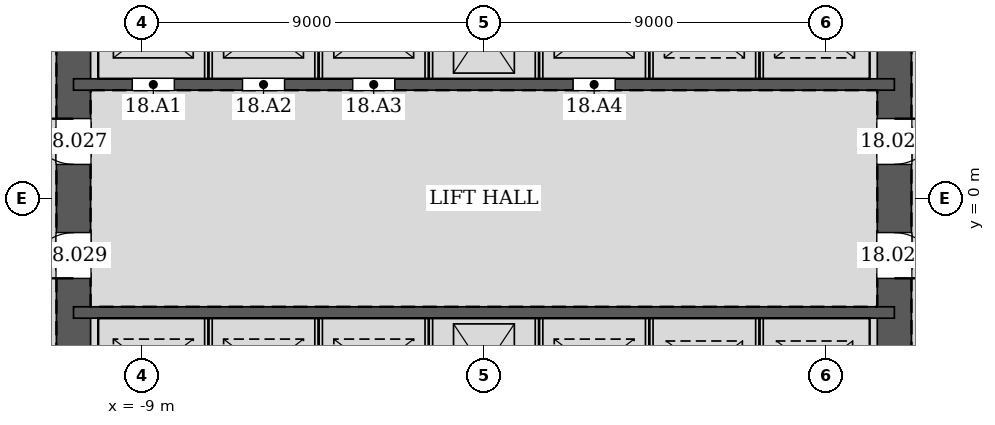
"""IFC4 building model, lengths in metres.
Left out: names, types, materials, properties, quantities, classifications, styles, units other than length and angle.
Written with IfcOpenShell. Run it as: python <this file> out.ifc"""

import sys

from ifc_helpers import new_model, si_unit, direction, frame, frame_2d, origin, place, context, subcontext, project, spatial, rectangle, extrude, element, fill, save


model = new_model("IFC4")
c1 = context("Model", 3, precision=1e-05, world=origin(), true_north=direction((0.0, 1.0)))
c2 = subcontext(c1, "Body", "Model", "MODEL_VIEW")
j1 = project(units=[si_unit("LENGTHUNIT", "METRE"), si_unit("PLANEANGLEUNIT", "RADIAN")], contexts=[c1])
p1 = place(None, origin())
s1 = spatial("IfcSite", under=j1, at=p1, CompositionType="ELEMENT")
p2 = place(p1, origin())
s2 = spatial("IfcBuilding", under=s1, at=p2, CompositionType="ELEMENT")
p3 = place(p2, frame((0.0, 0.0, 83.4)))
s3 = spatial("IfcBuildingStorey", under=s2, at=p3, CompositionType="ELEMENT", Elevation=83.4)
p4 = place(p3, frame((10.8, -10.8, 0.0), z_axis=(0.0, 0.0, 1.0), x_axis=(0.0, 1.0, 0.0)))
e1 = element("IfcWall", 1, at=p4, inside=s3, PredefinedType="SOLIDWALL", context=c2, shape_type="SweptSolid", body=[
    extrude(rectangle(XDim=21.6, YDim=0.9, at=frame_2d((10.8, 0.0))), origin(), (0.0, 0.0, 1.0), 4.2),
])
p5 = place(p4, frame((11.7, 0.0, 0.0)))
e2 = element("IfcOpeningElement", 2, at=p5, cuts=e1, PredefinedType="OPENING", context=c2, shape_type="SweptSolid", body=[
    extrude(rectangle(XDim=1.2, YDim=2.1, at=frame_2d((0.6, 1.05))), frame((0.0, 0.46, 0.0), z_axis=(0.0, -1.0, 0.0), x_axis=(1.0, 0.0, 0.0)), (0.0, 0.0, 1.0), 0.92),
])
p6 = place(p4, frame((8.7, 0.0, 0.0)))
e3 = element("IfcOpeningElement", 3, at=p6, cuts=e1, PredefinedType="OPENING", context=c2, shape_type="SweptSolid", body=[
    extrude(rectangle(XDim=1.2, YDim=2.1, at=frame_2d((0.6, 1.05))), frame((0.0, 0.46, 0.0), z_axis=(0.0, -1.0, 0.0), x_axis=(1.0, 0.0, 0.0)), (0.0, 0.0, 1.0), 0.92),
])
p7 = place(p3, frame((-10.8, 10.8, 0.0), z_axis=(0.0, 0.0, 1.0), x_axis=(0.0, -1.0, 0.0)))
e4 = element("IfcWall", 4, at=p7, inside=s3, PredefinedType="SOLIDWALL", context=c2, shape_type="SweptSolid", body=[
    extrude(rectangle(XDim=21.6, YDim=0.9, at=frame_2d((10.8, 0.0))), origin(), (0.0, 0.0, 1.0), 4.2),
])
p8 = place(p7, frame((8.7, 0.0, 0.0)))
e5 = element("IfcOpeningElement", 5, at=p8, cuts=e4, PredefinedType="OPENING", context=c2, shape_type="SweptSolid", body=[
    extrude(rectangle(XDim=1.2, YDim=2.1, at=frame_2d((0.6, 1.05))), frame((0.0, 0.46, 0.0), z_axis=(0.0, -1.0, 0.0), x_axis=(1.0, 0.0, 0.0)), (0.0, 0.0, 1.0), 0.92),
])
p9 = place(p7, frame((11.7, 0.0, 0.0)))
e6 = element("IfcOpeningElement", 6, at=p9, cuts=e4, PredefinedType="OPENING", context=c2, shape_type="SweptSolid", body=[
    extrude(rectangle(XDim=1.2, YDim=2.1, at=frame_2d((0.6, 1.05))), frame((0.0, 0.46, 0.0), z_axis=(0.0, -1.0, 0.0), x_axis=(1.0, 0.0, 0.0)), (0.0, 0.0, 1.0), 0.92),
])
p10 = place(p3, frame((-10.8, 3.0, 0.0), z_axis=(0.0, 0.0, 1.0), x_axis=(1.0, 0.0, 0.0)))
e7 = element("IfcWall", 7, at=p10, inside=s3, PredefinedType="SOLIDWALL", context=c2, shape_type="SweptSolid", body=[
    extrude(rectangle(XDim=21.6, YDim=0.3, at=frame_2d((10.8, 0.0))), origin(), (0.0, 0.0, 1.0), 4.2),
])
p11 = place(p10, frame((1.55, 0.0, 0.0)))
e8 = element("IfcOpeningElement", 8, at=p11, cuts=e7, PredefinedType="OPENING", context=c2, shape_type="SweptSolid", body=[
    extrude(rectangle(XDim=1.1, YDim=2.1, at=frame_2d((0.55, 1.05))), frame((0.0, 0.16, 0.0), z_axis=(0.0, -1.0, 0.0), x_axis=(1.0, 0.0, 0.0)), (0.0, 0.0, 1.0), 0.32),
])
p12 = place(p10, frame((4.45, 0.0, 0.0)))
e9 = element("IfcOpeningElement", 9, at=p12, cuts=e7, PredefinedType="OPENING", context=c2, shape_type="SweptSolid", body=[
    extrude(rectangle(XDim=1.1, YDim=2.1, at=frame_2d((0.55, 1.05))), frame((0.0, 0.16, 0.0), z_axis=(0.0, -1.0, 0.0), x_axis=(1.0, 0.0, 0.0)), (0.0, 0.0, 1.0), 0.32),
])
p13 = place(p10, frame((7.35, 0.0, 0.0)))
e10 = element("IfcOpeningElement", 10, at=p13, cuts=e7, PredefinedType="OPENING", context=c2, shape_type="SweptSolid", body=[
    extrude(rectangle(XDim=1.1, YDim=2.1, at=frame_2d((0.55, 1.05))), frame((0.0, 0.16, 0.0), z_axis=(0.0, -1.0, 0.0), x_axis=(1.0, 0.0, 0.0)), (0.0, 0.0, 1.0), 0.32),
])
p14 = place(p10, frame((13.15, 0.0, 0.0)))
e11 = element("IfcOpeningElement", 11, at=p14, cuts=e7, PredefinedType="OPENING", context=c2, shape_type="SweptSolid", body=[
    extrude(rectangle(XDim=1.1, YDim=2.1, at=frame_2d((0.55, 1.05))), frame((0.0, 0.16, 0.0), z_axis=(0.0, -1.0, 0.0), x_axis=(1.0, 0.0, 0.0)), (0.0, 0.0, 1.0), 0.32),
])
p15 = place(p3, frame((-10.8, -3.0, 0.0), z_axis=(0.0, 0.0, 1.0), x_axis=(1.0, 0.0, 0.0)))
e12 = element("IfcWall", 12, at=p15, inside=s3, PredefinedType="SOLIDWALL", context=c2, shape_type="SweptSolid", body=[
    extrude(rectangle(XDim=21.6, YDim=0.3, at=frame_2d((10.8, 0.0))), origin(), (0.0, 0.0, 1.0), 4.2),
])
for number, where, z_axis, x_axis in (
    (13, (-7.25, 3.15, 0.0), (0.0, 0.0, 1.0), (0.0, 1.0, 0.0)),
    (14, (-4.35, 3.15, 0.0), (0.0, 0.0, 1.0), (0.0, 1.0, 0.0)),
    (15, (-1.45, 3.15, 0.0), (0.0, 0.0, 1.0), (0.0, 1.0, 0.0)),
    (16, (1.45, 3.15, 0.0), (0.0, 0.0, 1.0), (0.0, 1.0, 0.0)),
    (17, (4.35, 3.15, 0.0), (0.0, 0.0, 1.0), (0.0, 1.0, 0.0)),
    (18, (7.25, 3.15, 0.0), (0.0, 0.0, 1.0), (0.0, 1.0, 0.0)),
    (19, (-7.25, -5.85, 0.0), (0.0, 0.0, 1.0), (0.0, 1.0, 0.0)),
    (20, (-4.35, -5.85, 0.0), (0.0, 0.0, 1.0), (0.0, 1.0, 0.0)),
    (21, (-1.45, -5.85, 0.0), (0.0, 0.0, 1.0), (0.0, 1.0, 0.0)),
    (22, (1.45, -5.85, 0.0), (0.0, 0.0, 1.0), (0.0, 1.0, 0.0)),
    (23, (4.35, -5.85, 0.0), (0.0, 0.0, 1.0), (0.0, 1.0, 0.0)),
    (24, (7.25, -5.85, 0.0), (0.0, 0.0, 1.0), (0.0, 1.0, 0.0)),
):
    element("IfcWall", number, at=place(p3, frame(where, z_axis=z_axis, x_axis=x_axis)), inside=s3, PredefinedType="PARTITIONING", context=c2, shape_type="SweptSolid", body=[
        extrude(rectangle(XDim=2.7, YDim=0.2, at=frame_2d((1.35, 0.0))), origin(), (0.0, 0.0, 1.0), 4.2),
    ])
p16 = place(p5, frame((1.2, 0.0, 0.0), z_axis=(0.0, 0.0, 1.0), x_axis=(-1.0, 0.0, 0.0)))
e25 = element("IfcDoor", 25, at=p16, inside=s3, OperationType="SINGLE_SWING_LEFT", PredefinedType="DOOR", context=c2, shape_type="SweptSolid", body=[
    extrude(rectangle(XDim=1.2, YDim=2.1, at=frame_2d((0.6, 1.05))), frame((0.0, 0.025, 0.0), z_axis=(0.0, -1.0, 0.0), x_axis=(1.0, 0.0, 0.0)), (0.0, 0.0, 1.0), 0.05),
])
fill(e2, e25)
p17 = place(p8, frame((1.2, 0.0, 0.0), z_axis=(0.0, 0.0, 1.0), x_axis=(-1.0, 0.0, 0.0)))
e26 = element("IfcDoor", 26, at=p17, inside=s3, OperationType="SINGLE_SWING_RIGHT", PredefinedType="DOOR", context=c2, shape_type="SweptSolid", body=[
    extrude(rectangle(XDim=1.2, YDim=2.1, at=frame_2d((0.6, 1.05))), frame((0.0, 0.025, 0.0), z_axis=(0.0, -1.0, 0.0), x_axis=(1.0, 0.0, 0.0)), (0.0, 0.0, 1.0), 0.05),
])
fill(e5, e26)
p18 = place(p6, frame((1.2, 0.0, 0.0), z_axis=(0.0, 0.0, 1.0), x_axis=(-1.0, 0.0, 0.0)))
e27 = element("IfcDoor", 27, at=p18, inside=s3, OperationType="SINGLE_SWING_RIGHT", PredefinedType="DOOR", context=c2, shape_type="SweptSolid", body=[
    extrude(rectangle(XDim=1.2, YDim=2.1, at=frame_2d((0.6, 1.05))), frame((0.0, 0.025, 0.0), z_axis=(0.0, -1.0, 0.0), x_axis=(1.0, 0.0, 0.0)), (0.0, 0.0, 1.0), 0.05),
])
fill(e3, e27)
p19 = place(p9, frame((1.2, 0.0, 0.0), z_axis=(0.0, 0.0, 1.0), x_axis=(-1.0, 0.0, 0.0)))
e28 = element("IfcDoor", 28, at=p19, inside=s3, OperationType="SINGLE_SWING_LEFT", PredefinedType="DOOR", context=c2, shape_type="SweptSolid", body=[
    extrude(rectangle(XDim=1.2, YDim=2.1, at=frame_2d((0.6, 1.05))), frame((0.0, 0.025, 0.0), z_axis=(0.0, -1.0, 0.0), x_axis=(1.0, 0.0, 0.0)), (0.0, 0.0, 1.0), 0.05),
])
fill(e6, e28)
p20 = place(p11, origin())
e29 = element("IfcDoor", 29, at=p20, inside=s3, OperationType="DOUBLE_DOOR_SLIDING", PredefinedType="DOOR", context=c2, shape_type="SweptSolid", body=[
    extrude(rectangle(XDim=1.1, YDim=2.1, at=frame_2d((0.55, 1.05))), frame((0.0, 0.025, 0.0), z_axis=(0.0, -1.0, 0.0), x_axis=(1.0, 0.0, 0.0)), (0.0, 0.0, 1.0), 0.05),
])
fill(e8, e29)
p21 = place(p12, origin())
e30 = element("IfcDoor", 30, at=p21, inside=s3, OperationType="DOUBLE_DOOR_SLIDING", PredefinedType="DOOR", context=c2, shape_type="SweptSolid", body=[
    extrude(rectangle(XDim=1.1, YDim=2.1, at=frame_2d((0.55, 1.05))), frame((0.0, 0.025, 0.0), z_axis=(0.0, -1.0, 0.0), x_axis=(1.0, 0.0, 0.0)), (0.0, 0.0, 1.0), 0.05),
])
fill(e9, e30)
p22 = place(p13, origin())
e31 = element("IfcDoor", 31, at=p22, inside=s3, OperationType="DOUBLE_DOOR_SLIDING", PredefinedType="DOOR", context=c2, shape_type="SweptSolid", body=[
    extrude(rectangle(XDim=1.1, YDim=2.1, at=frame_2d((0.55, 1.05))), frame((0.0, 0.025, 0.0), z_axis=(0.0, -1.0, 0.0), x_axis=(1.0, 0.0, 0.0)), (0.0, 0.0, 1.0), 0.05),
])
fill(e10, e31)
p23 = place(p14, origin())
e32 = element("IfcDoor", 32, at=p23, inside=s3, OperationType="DOUBLE_DOOR_SLIDING", PredefinedType="DOOR", context=c2, shape_type="SweptSolid", body=[
    extrude(rectangle(XDim=1.1, YDim=2.1, at=frame_2d((0.55, 1.05))), frame((0.0, 0.025, 0.0), z_axis=(0.0, -1.0, 0.0), x_axis=(1.0, 0.0, 0.0)), (0.0, 0.0, 1.0), 0.05),
])
fill(e11, e32)
save(model, sys.argv[1])
